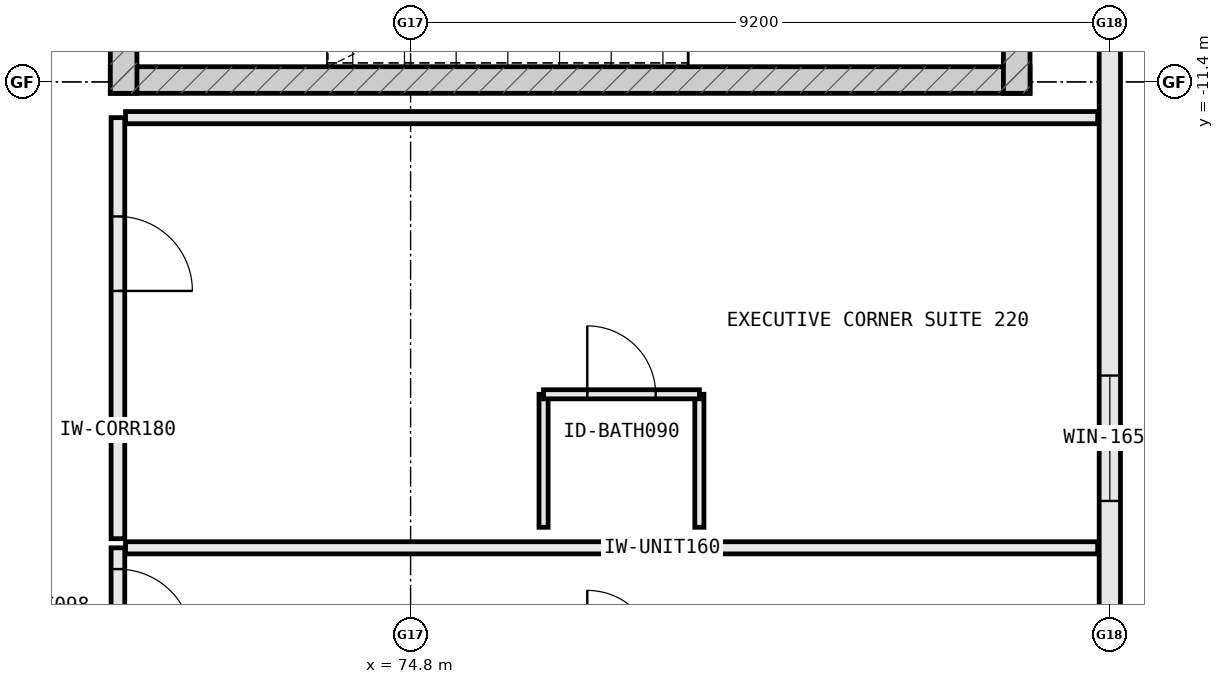
"""IFC4 building model, lengths in metres.
Left out: names, types, materials, properties, quantities, classifications, styles, units other than length and angle.
Written with IfcOpenShell. Run it as: python <this file> out.ifc"""

import sys

from ifc_helpers import new_model, si_unit, direction, frame, frame_2d, origin, place, context, subcontext, project, spatial, rectangle, extrude, element, fill, save


model = new_model("IFC4")
c1 = context("Model", 3, precision=1e-05, world=origin(), true_north=direction((0.0, 1.0)))
c2 = subcontext(c1, "Body", "Model", "MODEL_VIEW")
j1 = project(units=[si_unit("LENGTHUNIT", "METRE"), si_unit("PLANEANGLEUNIT", "RADIAN")], contexts=[c1])
p1 = place(None, origin())
s1 = spatial("IfcSite", under=j1, at=p1, CompositionType="ELEMENT")
p2 = place(p1, origin())
s2 = spatial("IfcBuilding", under=s1, at=p2, CompositionType="ELEMENT")
p3 = place(p2, frame((0.0, 0.0, 31.4)))
s3 = spatial("IfcBuildingStorey", under=s2, at=p3, CompositionType="ELEMENT", Elevation=31.4)
p4 = place(p3, frame((84.0, -18.377, 0.0), z_axis=(0.0, 0.0, 1.0), x_axis=(0.0, 1.0, 0.0)))
e1 = element("IfcWall", 1, at=p4, inside=s3, PredefinedType="STANDARD", context=c2, shape_type="SweptSolid", body=[
    extrude(rectangle(XDim=9.154, YDim=0.28, at=frame_2d((4.577, 0.0))), origin(), (0.0, 0.0, 1.0), 2.97),
])
p5 = place(p4, frame((1.463, 0.0, 0.85)))
e2 = element("IfcOpeningElement", 2, at=p5, cuts=e1, PredefinedType="OPENING", context=c2, shape_type="SweptSolid", body=[
    extrude(rectangle(XDim=1.65, YDim=1.8, at=frame_2d((0.825, 0.9))), frame((0.0, 0.152, 0.0), z_axis=(0.0, -1.0, 0.0), x_axis=(1.0, 0.0, 0.0)), (0.0, 0.0, 1.0), 0.304),
])
p6 = place(p3, frame((70.85, -11.375, 0.0), z_axis=(0.0, 0.0, 1.0), x_axis=(1.0, 0.0, 0.0)))
e3 = element("IfcWall", 3, at=p6, inside=s3, PredefinedType="SHEAR", context=c2, shape_type="SweptSolid", body=[
    extrude(rectangle(XDim=12.1, YDim=0.35, at=frame_2d((6.05, 0.0))), origin(), (0.0, 0.0, 1.0), 3.8),
])
p7 = place(p3, frame((82.775, -11.55, 0.0), z_axis=(0.0, 0.0, 1.0), x_axis=(0.0, 1.0, 0.0)))
e4 = element("IfcWall", 4, at=p7, inside=s3, PredefinedType="SHEAR", context=c2, shape_type="SweptSolid", body=[
    extrude(rectangle(XDim=5.1, YDim=0.35, at=frame_2d((2.55, 0.0))), origin(), (0.0, 0.0, 1.0), 3.8),
])
p8 = place(p3, frame((71.025, -6.45, 0.0), z_axis=(0.0, 0.0, 1.0), x_axis=(0.0, -1.0, 0.0)))
e5 = element("IfcWall", 5, at=p8, inside=s3, PredefinedType="SHEAR", context=c2, shape_type="SweptSolid", body=[
    extrude(rectangle(XDim=5.1, YDim=0.35, at=frame_2d((2.55, 0.0))), origin(), (0.0, 0.0, 1.0), 3.8),
])
p9 = place(p8, frame((2.0, 0.0, 0.0)))
e6 = element("IfcOpeningElement", 6, at=p9, cuts=e5, PredefinedType="OPENING", context=c2, shape_type="SweptSolid", body=[
    extrude(rectangle(XDim=1.1, YDim=2.2, at=frame_2d((0.55, 1.1))), frame((0.0, 0.187, 0.0), z_axis=(0.0, -1.0, 0.0), x_axis=(1.0, 0.0, 0.0)), (0.0, 0.0, 1.0), 0.374),
])
p10 = place(p3, frame((70.95, -17.53, 0.0), z_axis=(0.0, 0.0, 1.0), x_axis=(0.0, -1.0, 0.0)))
e7 = element("IfcWall", 7, at=p10, inside=s3, PredefinedType="PARTITIONING", context=c2, shape_type="SweptSolid", body=[
    extrude(rectangle(XDim=3.36, YDim=0.18, at=frame_2d((1.68, 0.0))), origin(), (0.0, 0.0, 1.0), 3.555),
])
p11 = place(p10, frame((0.28, 0.0, 0.0)))
e8 = element("IfcOpeningElement", 8, at=p11, cuts=e7, PredefinedType="OPENING", context=c2, shape_type="SweptSolid", body=[
    extrude(rectangle(XDim=0.98, YDim=2.18, at=frame_2d((0.49, 1.09))), frame((0.0, 0.102, 0.0), z_axis=(0.0, -1.0, 0.0), x_axis=(1.0, 0.0, 0.0)), (0.0, 0.0, 1.0), 0.204),
])
p12 = place(p3, frame((71.05, -17.53, 0.0), z_axis=(0.0, 0.0, 1.0), x_axis=(1.0, 0.0, 0.0)))
e9 = element("IfcWall", 9, at=p12, inside=s3, PredefinedType="PARTITIONING", context=c2, shape_type="SweptSolid", body=[
    extrude(rectangle(XDim=12.79, YDim=0.16, at=frame_2d((6.395, 0.0))), origin(), (0.0, 0.0, 1.0), 3.555),
])
p13 = place(p3, frame((70.95, -11.87, 0.0), z_axis=(0.0, 0.0, 1.0), x_axis=(0.0, -1.0, 0.0)))
e10 = element("IfcWall", 10, at=p13, inside=s3, PredefinedType="PARTITIONING", context=c2, shape_type="SweptSolid", body=[
    extrude(rectangle(XDim=5.54, YDim=0.18, at=frame_2d((2.77, 0.0))), origin(), (0.0, 0.0, 1.0), 3.555),
])
p14 = place(p13, frame((1.3, 0.0, 0.0)))
e11 = element("IfcOpeningElement", 11, at=p14, cuts=e10, PredefinedType="OPENING", context=c2, shape_type="SweptSolid", body=[
    extrude(rectangle(XDim=0.98, YDim=2.18, at=frame_2d((0.49, 1.09))), frame((0.0, 0.102, 0.0), z_axis=(0.0, -1.0, 0.0), x_axis=(1.0, 0.0, 0.0)), (0.0, 0.0, 1.0), 0.204),
])
p15 = place(p3, frame((71.05, -11.87, 0.0), z_axis=(0.0, 0.0, 1.0), x_axis=(1.0, 0.0, 0.0)))
e12 = element("IfcWall", 12, at=p15, inside=s3, PredefinedType="PARTITIONING", context=c2, shape_type="SweptSolid", body=[
    extrude(rectangle(XDim=12.79, YDim=0.16, at=frame_2d((6.395, 0.0))), origin(), (0.0, 0.0, 1.0), 3.555),
])
for number, where, z_axis, x_axis in (
    (13, (76.55, -17.26, 0.0), (0.0, 0.0, 1.0), (0.0, 1.0, 0.0)),
    (14, (78.6, -17.26, 0.0), (0.0, 0.0, 1.0), (0.0, 1.0, 0.0)),
):
    element("IfcWall", number, at=place(p3, frame(where, z_axis=z_axis, x_axis=x_axis)), inside=s3, PredefinedType="PARTITIONING", context=c2, shape_type="SweptSolid", body=[
        extrude(rectangle(XDim=1.75, YDim=0.12, at=frame_2d((0.875, 0.0))), origin(), (0.0, 0.0, 1.0), 3.555),
    ])
p16 = place(p3, frame((76.55, -15.51, 0.0), z_axis=(0.0, 0.0, 1.0), x_axis=(1.0, 0.0, 0.0)))
e15 = element("IfcWall", 15, at=p16, inside=s3, PredefinedType="PARTITIONING", context=c2, shape_type="SweptSolid", body=[
    extrude(rectangle(XDim=2.05, YDim=0.12, at=frame_2d((1.025, 0.0))), origin(), (0.0, 0.0, 1.0), 3.555),
])
p17 = place(p16, frame((0.575, 0.0, 0.0)))
e16 = element("IfcOpeningElement", 16, at=p17, cuts=e15, PredefinedType="OPENING", context=c2, shape_type="SweptSolid", body=[
    extrude(rectangle(XDim=0.9, YDim=2.15, at=frame_2d((0.45, 1.075))), frame((0.0, 0.072, 0.0), z_axis=(0.0, -1.0, 0.0), x_axis=(1.0, 0.0, 0.0)), (0.0, 0.0, 1.0), 0.144),
])
p18 = place(p5, origin())
e17 = element("IfcWindow", 17, at=p18, inside=s3, PartitioningType="SINGLE_PANEL", PredefinedType="WINDOW", context=c2, shape_type="SweptSolid", body=[
    extrude(rectangle(XDim=1.65, YDim=1.8, at=frame_2d((0.825, 0.9))), frame((0.0, 0.03, 0.0), z_axis=(0.0, -1.0, 0.0), x_axis=(1.0, 0.0, 0.0)), (0.0, 0.0, 1.0), 0.06),
])
fill(e2, e17)
p19 = place(p11, origin())
e18 = element("IfcDoor", 18, at=p19, inside=s3, OperationType="SINGLE_SWING_RIGHT", PredefinedType="DOOR", context=c2, shape_type="SweptSolid", body=[
    extrude(rectangle(XDim=0.98, YDim=2.18, at=frame_2d((0.49, 1.09))), frame((0.0, 0.025, 0.0), z_axis=(0.0, -1.0, 0.0), x_axis=(1.0, 0.0, 0.0)), (0.0, 0.0, 1.0), 0.05),
])
fill(e8, e18)
p20 = place(p14, origin())
e19 = element("IfcDoor", 19, at=p20, inside=s3, OperationType="SINGLE_SWING_RIGHT", PredefinedType="DOOR", context=c2, shape_type="SweptSolid", body=[
    extrude(rectangle(XDim=0.98, YDim=2.18, at=frame_2d((0.49, 1.09))), frame((0.0, 0.025, 0.0), z_axis=(0.0, -1.0, 0.0), x_axis=(1.0, 0.0, 0.0)), (0.0, 0.0, 1.0), 0.05),
])
fill(e11, e19)
p21 = place(p17, origin())
e20 = element("IfcDoor", 20, at=p21, inside=s3, OperationType="SINGLE_SWING_LEFT", PredefinedType="DOOR", context=c2, shape_type="SweptSolid", body=[
    extrude(rectangle(XDim=0.9, YDim=2.15, at=frame_2d((0.45, 1.075))), frame((0.0, 0.025, 0.0), z_axis=(0.0, -1.0, 0.0), x_axis=(1.0, 0.0, 0.0)), (0.0, 0.0, 1.0), 0.05),
])
fill(e16, e20)
save(model, sys.argv[1])
